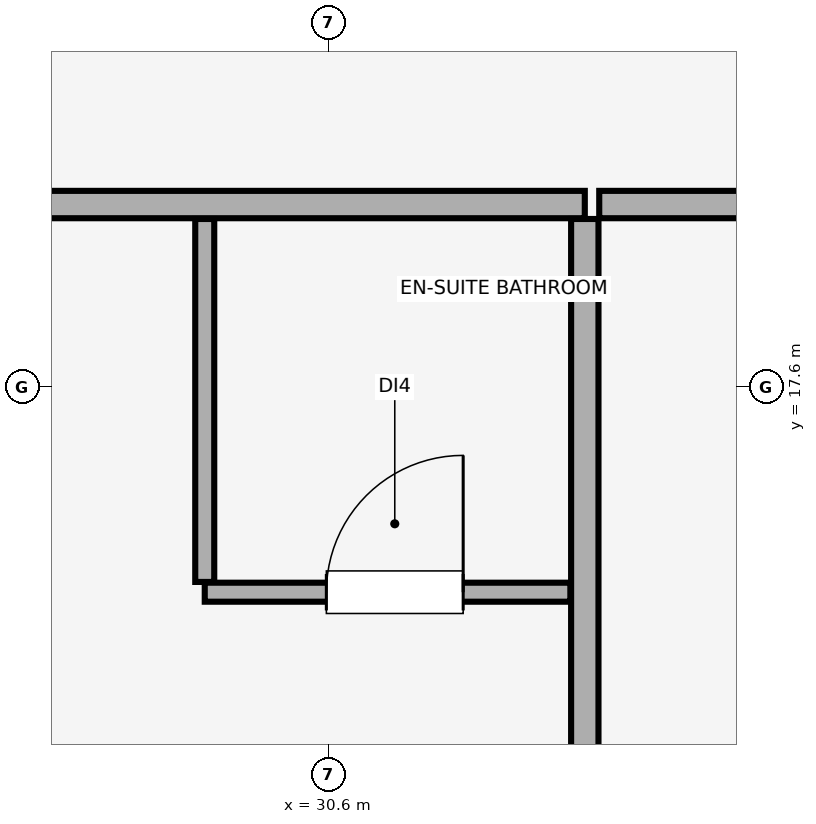
"""IFC4 building model, lengths in metres.
Left out: names, types, materials, properties, quantities, classifications, styles, units other than length and angle.
Written with IfcOpenShell. Run it as: python <this file> out.ifc"""

import sys

from ifc_helpers import new_model, si_unit, direction, frame, frame_2d, origin, place, context, subcontext, project, spatial, rectangle, extrude, element, fill, save


model = new_model("IFC4")
c1 = context("Model", 3, precision=1e-05, world=origin(), true_north=direction((0.0, 1.0)))
c2 = subcontext(c1, "Body", "Model", "MODEL_VIEW")
j1 = project(units=[si_unit("LENGTHUNIT", "METRE"), si_unit("PLANEANGLEUNIT", "RADIAN")], contexts=[c1])
p1 = place(None, origin())
s1 = spatial("IfcSite", under=j1, at=p1, CompositionType="ELEMENT")
p2 = place(p1, origin())
s2 = spatial("IfcBuilding", under=s1, at=p2, CompositionType="ELEMENT")
p3 = place(p2, frame((0.0, 0.0, 285.9)))
s3 = spatial("IfcBuildingStorey", under=s2, at=p3, CompositionType="ELEMENT", Elevation=285.9)
p4 = place(p3, frame((22.662, 18.8, 0.0), z_axis=(0.0, 0.0, 1.0), x_axis=(1.0, 0.0, 0.0)))
e1 = element("IfcWall", 1, at=p4, inside=s3, PredefinedType="PARTITIONING", context=c2, shape_type="SweptSolid", body=[
    extrude(rectangle(XDim=9.622, YDim=0.18, at=frame_2d((4.811, 0.0))), origin(), (0.0, 0.0, 1.0), 4.1),
])
p5 = place(p4, frame((3.37, 0.0, 0.0)))
e2 = element("IfcOpeningElement", 2, at=p5, cuts=e1, PredefinedType="OPENING", context=c2, shape_type="SweptSolid", body=[
    extrude(rectangle(XDim=1.0, YDim=2.15, at=frame_2d((0.5, 1.075))), frame((0.0, 0.1, 0.0), z_axis=(0.0, -1.0, 0.0), x_axis=(1.0, 0.0, 0.0)), (0.0, 0.0, 1.0), 0.2),
])
p6 = place(p3, frame((32.283, 7.15, 0.0), z_axis=(0.0, 0.0, 1.0), x_axis=(0.0, 1.0, 0.0)))
e3 = element("IfcWall", 3, at=p6, inside=s3, PredefinedType="PARTITIONING", context=c2, shape_type="SweptSolid", body=[
    extrude(rectangle(XDim=11.555, YDim=0.18, at=frame_2d((5.778, 0.0))), origin(), (0.0, 0.0, 1.0), 4.1),
])
p7 = place(p3, frame((29.783, 16.25, 0.0), z_axis=(0.0, 0.0, 1.0), x_axis=(1.0, 0.0, 0.0)))
e4 = element("IfcWall", 4, at=p7, inside=s3, PredefinedType="PARTITIONING", context=c2, shape_type="SweptSolid", body=[
    extrude(rectangle(XDim=2.405, YDim=0.125, at=frame_2d((1.203, 0.0))), origin(), (0.0, 0.0, 1.0), 4.1),
])
p8 = place(p7, frame((0.8, 0.0, 0.0)))
e5 = element("IfcOpeningElement", 5, at=p8, cuts=e4, PredefinedType="OPENING", context=c2, shape_type="SweptSolid", body=[
    extrude(rectangle(XDim=0.9, YDim=2.1, at=frame_2d((0.45, 1.05))), frame((0.0, 0.073, 0.0), z_axis=(0.0, -1.0, 0.0), x_axis=(1.0, 0.0, 0.0)), (0.0, 0.0, 1.0), 0.145),
])
p9 = place(p3, frame((29.783, 16.317, 0.0), z_axis=(0.0, 0.0, 1.0), x_axis=(0.0, 1.0, 0.0)))
e6 = element("IfcWall", 6, at=p9, inside=s3, PredefinedType="PARTITIONING", context=c2, shape_type="SweptSolid", body=[
    extrude(rectangle(XDim=2.388, YDim=0.125, at=frame_2d((1.194, 0.0))), origin(), (0.0, 0.0, 1.0), 4.1),
])
p10 = place(p3, frame((32.378, 18.8, 0.0), z_axis=(0.0, 0.0, 1.0), x_axis=(1.0, 0.0, 0.0)))
e7 = element("IfcWall", 7, at=p10, inside=s3, PredefinedType="PARTITIONING", context=c2, shape_type="SweptSolid", body=[
    extrude(rectangle(XDim=9.622, YDim=0.18, at=frame_2d((4.811, 0.0))), origin(), (0.0, 0.0, 1.0), 4.1),
])
p11 = place(p10, frame((1.773, 0.0, 0.0)))
e8 = element("IfcOpeningElement", 8, at=p11, cuts=e7, PredefinedType="OPENING", context=c2, shape_type="SweptSolid", body=[
    extrude(rectangle(XDim=1.0, YDim=2.15, at=frame_2d((0.5, 1.075))), frame((0.0, 0.1, 0.0), z_axis=(0.0, -1.0, 0.0), x_axis=(1.0, 0.0, 0.0)), (0.0, 0.0, 1.0), 0.2),
])
p12 = place(p8, origin())
e9 = element("IfcDoor", 9, at=p12, inside=s3, OperationType="SINGLE_SWING_RIGHT", PredefinedType="DOOR", context=c2, shape_type="SweptSolid", body=[
    extrude(rectangle(XDim=0.9, YDim=2.1, at=frame_2d((0.45, 1.05))), frame((0.0, 0.025, 0.0), z_axis=(0.0, -1.0, 0.0), x_axis=(1.0, 0.0, 0.0)), (0.0, 0.0, 1.0), 0.05),
])
fill(e5, e9)
save(model, sys.argv[1])
